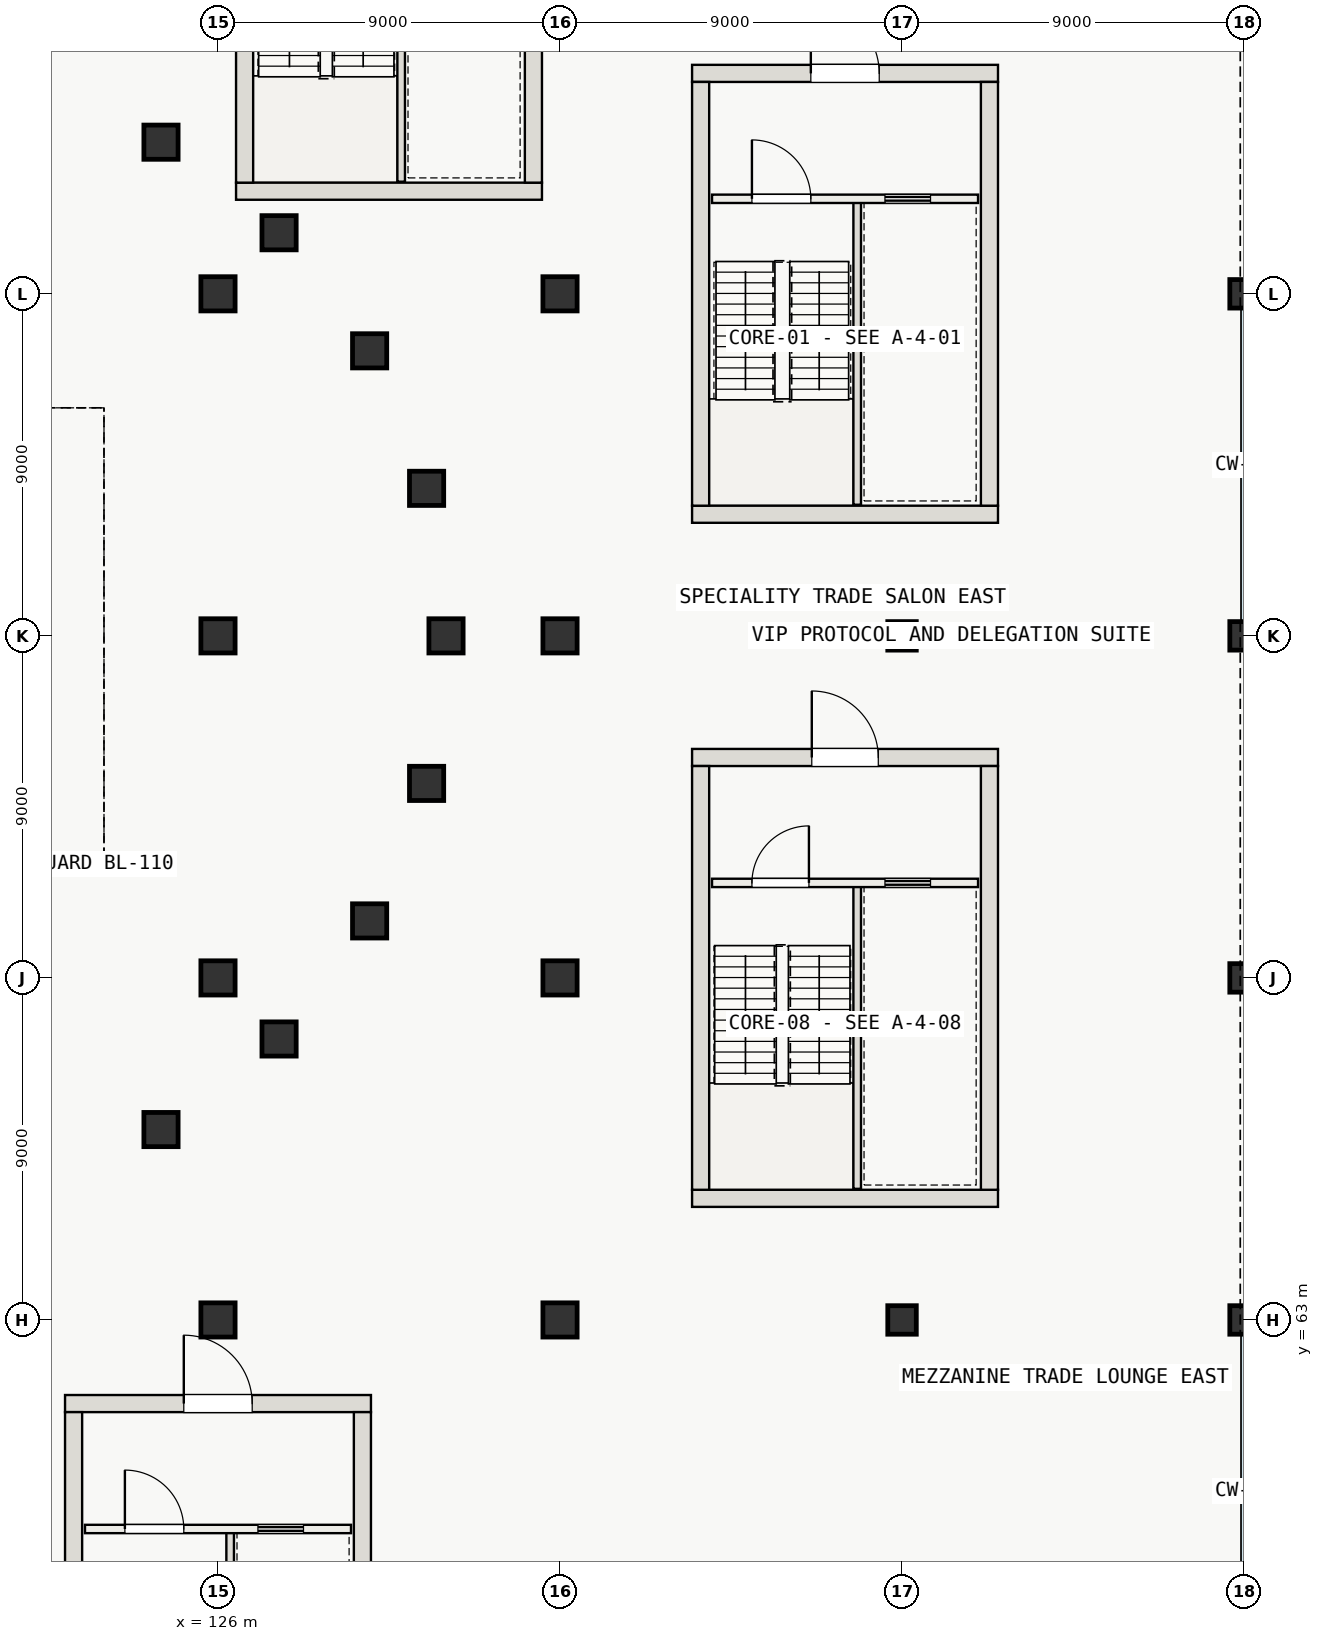
"""IFC4 building model, lengths in metres.
Left out: names, types, materials, properties, quantities, classifications, styles, units other than length and angle.
Written with IfcOpenShell. Run it as: python <this file> out.ifc"""

import sys

from ifc_helpers import new_model, si_unit, direction, frame, frame_2d, origin, origin_2d, place, context, subcontext, project, spatial, rectangle, circle, extrude, element, fill, save


model = new_model("IFC4")
c1 = context("Model", 3, precision=1e-05, world=origin(), true_north=direction((0.0, 1.0)))
c2 = subcontext(c1, "Body", "Model", "MODEL_VIEW")
j1 = project(units=[si_unit("LENGTHUNIT", "METRE"), si_unit("PLANEANGLEUNIT", "RADIAN")], contexts=[c1])
p1 = place(None, origin())
s1 = spatial("IfcSite", under=j1, at=p1, CompositionType="ELEMENT")
p2 = place(p1, origin())
s2 = spatial("IfcBuilding", under=s1, at=p2, CompositionType="ELEMENT")
p3 = place(p2, frame((0.0, 0.0, 12.0)))
s3 = spatial("IfcBuildingStorey", under=s2, at=p3, CompositionType="ELEMENT", Elevation=12.0)
p4 = place(p3, frame((138.475, 84.2, 0.0), z_axis=(0.0, 0.0, 1.0), x_axis=(1.0, 0.0, 0.0)))
e1 = element("IfcWall", 1, at=p4, inside=s3, PredefinedType="SHEAR", context=c2, shape_type="SweptSolid", body=[
    extrude(rectangle(XDim=8.05, YDim=0.45, at=frame_2d((4.025, 0.0))), origin(), (0.0, 0.0, 1.0), 4.8),
])
p5 = place(p3, frame((138.475, 95.8, 0.0), z_axis=(0.0, 0.0, 1.0), x_axis=(1.0, 0.0, 0.0)))
e2 = element("IfcWall", 2, at=p5, inside=s3, PredefinedType="SHEAR", context=c2, shape_type="SweptSolid", body=[
    extrude(rectangle(XDim=8.05, YDim=0.45, at=frame_2d((4.025, 0.0))), origin(), (0.0, 0.0, 1.0), 4.8),
])
p6 = place(p5, frame((3.125, 0.0, 0.0)))
e3 = element("IfcOpeningElement", 3, at=p6, cuts=e2, PredefinedType="OPENING", context=c2, shape_type="SweptSolid", body=[
    extrude(rectangle(XDim=1.8, YDim=2.3, at=frame_2d((0.9, 1.15))), frame((0.0, 0.235, 0.0), z_axis=(0.0, -1.0, 0.0), x_axis=(1.0, 0.0, 0.0)), (0.0, 0.0, 1.0), 0.47),
])
for number, where, z_axis, x_axis in (
    (4, (138.7, 84.425, 0.0), (0.0, 0.0, 1.0), (0.0, 1.0, 0.0)),
    (5, (146.3, 84.425, 0.0), (0.0, 0.0, 1.0), (0.0, 1.0, 0.0)),
):
    element("IfcWall", number, at=place(p3, frame(where, z_axis=z_axis, x_axis=x_axis)), inside=s3, PredefinedType="SHEAR", context=c2, shape_type="SweptSolid", body=[
        extrude(rectangle(XDim=11.15, YDim=0.45, at=frame_2d((5.575, 0.0))), origin(), (0.0, 0.0, 1.0), 4.8),
    ])
p7 = place(p3, frame((126.475, 92.7, 0.0), z_axis=(0.0, 0.0, 1.0), x_axis=(1.0, 0.0, 0.0)))
e6 = element("IfcWall", 6, at=p7, inside=s3, PredefinedType="SHEAR", context=c2, shape_type="SweptSolid", body=[
    extrude(rectangle(XDim=8.05, YDim=0.45, at=frame_2d((4.025, 0.0))), origin(), (0.0, 0.0, 1.0), 4.8),
])
for number, where, z_axis, x_axis in (
    (7, (126.7, 92.925, 0.0), (0.0, 0.0, 1.0), (0.0, 1.0, 0.0)),
    (8, (134.3, 92.925, 0.0), (0.0, 0.0, 1.0), (0.0, 1.0, 0.0)),
):
    element("IfcWall", number, at=place(p3, frame(where, z_axis=z_axis, x_axis=x_axis)), inside=s3, PredefinedType="SHEAR", context=c2, shape_type="SweptSolid", body=[
        extrude(rectangle(XDim=11.15, YDim=0.45, at=frame_2d((5.575, 0.0))), origin(), (0.0, 0.0, 1.0), 4.8),
    ])
p8 = place(p3, frame((121.975, 60.8, 0.0), z_axis=(0.0, 0.0, 1.0), x_axis=(1.0, 0.0, 0.0)))
e9 = element("IfcWall", 9, at=p8, inside=s3, PredefinedType="SHEAR", context=c2, shape_type="SweptSolid", body=[
    extrude(rectangle(XDim=8.05, YDim=0.45, at=frame_2d((4.025, 0.0))), origin(), (0.0, 0.0, 1.0), 4.8),
])
p9 = place(p8, frame((3.125, 0.0, 0.0)))
e10 = element("IfcOpeningElement", 10, at=p9, cuts=e9, PredefinedType="OPENING", context=c2, shape_type="SweptSolid", body=[
    extrude(rectangle(XDim=1.8, YDim=2.3, at=frame_2d((0.9, 1.15))), frame((0.0, 0.235, 0.0), z_axis=(0.0, -1.0, 0.0), x_axis=(1.0, 0.0, 0.0)), (0.0, 0.0, 1.0), 0.47),
])
for number, where, z_axis, x_axis in (
    (11, (122.2, 49.425, 0.0), (0.0, 0.0, 1.0), (0.0, 1.0, 0.0)),
    (12, (129.8, 49.425, 0.0), (0.0, 0.0, 1.0), (0.0, 1.0, 0.0)),
):
    element("IfcWall", number, at=place(p3, frame(where, z_axis=z_axis, x_axis=x_axis)), inside=s3, PredefinedType="SHEAR", context=c2, shape_type="SweptSolid", body=[
        extrude(rectangle(XDim=11.15, YDim=0.45, at=frame_2d((5.575, 0.0))), origin(), (0.0, 0.0, 1.0), 4.8),
    ])
p10 = place(p3, frame((138.475, 66.2, 0.0), z_axis=(0.0, 0.0, 1.0), x_axis=(1.0, 0.0, 0.0)))
e13 = element("IfcWall", 13, at=p10, inside=s3, PredefinedType="SHEAR", context=c2, shape_type="SweptSolid", body=[
    extrude(rectangle(XDim=8.05, YDim=0.45, at=frame_2d((4.025, 0.0))), origin(), (0.0, 0.0, 1.0), 4.8),
])
p11 = place(p3, frame((138.475, 77.8, 0.0), z_axis=(0.0, 0.0, 1.0), x_axis=(1.0, 0.0, 0.0)))
e14 = element("IfcWall", 14, at=p11, inside=s3, PredefinedType="SHEAR", context=c2, shape_type="SweptSolid", body=[
    extrude(rectangle(XDim=8.05, YDim=0.45, at=frame_2d((4.025, 0.0))), origin(), (0.0, 0.0, 1.0), 4.8),
])
p12 = place(p11, frame((3.15, 0.0, 0.0)))
e15 = element("IfcOpeningElement", 15, at=p12, cuts=e14, PredefinedType="OPENING", context=c2, shape_type="SweptSolid", body=[
    extrude(rectangle(XDim=1.75, YDim=2.3, at=frame_2d((0.875, 1.15))), frame((0.0, 0.235, 0.0), z_axis=(0.0, -1.0, 0.0), x_axis=(1.0, 0.0, 0.0)), (0.0, 0.0, 1.0), 0.47),
])
for number, where, z_axis, x_axis in (
    (16, (138.7, 66.425, 0.0), (0.0, 0.0, 1.0), (0.0, 1.0, 0.0)),
    (17, (146.3, 66.425, 0.0), (0.0, 0.0, 1.0), (0.0, 1.0, 0.0)),
):
    element("IfcWall", number, at=place(p3, frame(where, z_axis=z_axis, x_axis=x_axis)), inside=s3, PredefinedType="SHEAR", context=c2, shape_type="SweptSolid", body=[
        extrude(rectangle(XDim=11.15, YDim=0.45, at=frame_2d((5.575, 0.0))), origin(), (0.0, 0.0, 1.0), 4.8),
    ])
for number, where, z_axis, x_axis in (
    (18, (124.5, 68.01, 0.0), (0.0, 0.0, 1.0), (1.0, 0.0, 0.0)),
    (19, (124.5, 93.99, 0.0), (0.0, 0.0, 1.0), (1.0, 0.0, 0.0)),
):
    element("IfcColumn", number, at=place(p3, frame(where, z_axis=z_axis, x_axis=x_axis)), inside=s3, PredefinedType="COLUMN", context=c2, shape_type="SweptSolid", body=[
        extrude(circle(Radius=0.45, at=origin_2d()), origin(), (0.0, 0.0, 1.0), 4.8),
    ])
for number, where, z_axis, x_axis in (
    (20, (126.0, 63.0, 0.0), (0.0, 0.0, 1.0), (1.0, 0.0, 0.0)),
    (21, (126.0, 72.0, 0.0), (0.0, 0.0, 1.0), (1.0, 0.0, 0.0)),
    (22, (126.0, 81.0, 0.0), (0.0, 0.0, 1.0), (1.0, 0.0, 0.0)),
    (23, (126.0, 90.0, 0.0), (0.0, 0.0, 1.0), (1.0, 0.0, 0.0)),
):
    element("IfcColumn", number, at=place(p3, frame(where, z_axis=z_axis, x_axis=x_axis)), inside=s3, PredefinedType="COLUMN", context=c2, shape_type="SweptSolid", body=[
        extrude(rectangle(XDim=0.9, YDim=0.9, at=origin_2d()), origin(), (0.0, 0.0, 1.0), 4.8),
    ])
for number, where, z_axis, x_axis in (
    (24, (127.607, 70.393, 0.0), (0.0, 0.0, 1.0), (1.0, 0.0, 0.0)),
    (25, (127.607, 91.607, 0.0), (0.0, 0.0, 1.0), (1.0, 0.0, 0.0)),
    (26, (129.99, 73.5, 0.0), (0.0, 0.0, 1.0), (1.0, 0.0, 0.0)),
    (27, (129.99, 88.5, 0.0), (0.0, 0.0, 1.0), (1.0, 0.0, 0.0)),
    (28, (131.489, 77.118, 0.0), (0.0, 0.0, 1.0), (1.0, 0.0, 0.0)),
    (29, (131.489, 84.882, 0.0), (0.0, 0.0, 1.0), (1.0, 0.0, 0.0)),
    (30, (132.0, 81.0, 0.0), (0.0, 0.0, 1.0), (1.0, 0.0, 0.0)),
):
    element("IfcColumn", number, at=place(p3, frame(where, z_axis=z_axis, x_axis=x_axis)), inside=s3, PredefinedType="COLUMN", context=c2, shape_type="SweptSolid", body=[
        extrude(circle(Radius=0.45, at=origin_2d()), origin(), (0.0, 0.0, 1.0), 4.8),
    ])
for number, where, z_axis, x_axis in (
    (31, (135.0, 63.0, 0.0), (0.0, 0.0, 1.0), (1.0, 0.0, 0.0)),
    (32, (135.0, 72.0, 0.0), (0.0, 0.0, 1.0), (1.0, 0.0, 0.0)),
    (33, (135.0, 81.0, 0.0), (0.0, 0.0, 1.0), (1.0, 0.0, 0.0)),
    (34, (135.0, 90.0, 0.0), (0.0, 0.0, 1.0), (1.0, 0.0, 0.0)),
):
    element("IfcColumn", number, at=place(p3, frame(where, z_axis=z_axis, x_axis=x_axis)), inside=s3, PredefinedType="COLUMN", context=c2, shape_type="SweptSolid", body=[
        extrude(rectangle(XDim=0.9, YDim=0.9, at=origin_2d()), origin(), (0.0, 0.0, 1.0), 4.8),
    ])
for number, where, z_axis, x_axis in (
    (35, (144.0, 63.0, 0.0), (0.0, 0.0, 1.0), (1.0, 0.0, 0.0)),
    (36, (144.0, 81.0, 0.0), (0.0, 0.0, 1.0), (1.0, 0.0, 0.0)),
    (37, (153.0, 63.0, 0.0), (0.0, 0.0, 1.0), (1.0, 0.0, 0.0)),
    (38, (153.0, 72.0, 0.0), (0.0, 0.0, 1.0), (1.0, 0.0, 0.0)),
    (39, (153.0, 81.0, 0.0), (0.0, 0.0, 1.0), (1.0, 0.0, 0.0)),
    (40, (153.0, 90.0, 0.0), (0.0, 0.0, 1.0), (1.0, 0.0, 0.0)),
):
    element("IfcColumn", number, at=place(p3, frame(where, z_axis=z_axis, x_axis=x_axis)), inside=s3, PredefinedType="COLUMN", context=c2, shape_type="SweptSolid", body=[
        extrude(rectangle(XDim=0.75, YDim=0.75, at=origin_2d()), origin(), (0.0, 0.0, 1.0), 4.8),
    ])
p13 = place(p3, frame((142.82, 84.45, 0.0), z_axis=(0.0, 0.0, 1.0), x_axis=(0.0, 1.0, 0.0)))
e41 = element("IfcWall", 41, at=p13, inside=s3, PredefinedType="SOLIDWALL", context=c2, shape_type="SweptSolid", body=[
    extrude(rectangle(XDim=8.0, YDim=0.2, at=frame_2d((4.0, 0.0))), origin(), (0.0, 0.0, 1.0), 4.8),
])
p14 = place(p3, frame((139.0, 92.5, 0.0), z_axis=(0.0, 0.0, 1.0), x_axis=(1.0, 0.0, 0.0)))
e42 = element("IfcWall", 42, at=p14, inside=s3, PredefinedType="SOLIDWALL", context=c2, shape_type="SweptSolid", body=[
    extrude(rectangle(XDim=7.0, YDim=0.22, at=frame_2d((3.5, 0.0))), origin(), (0.0, 0.0, 1.0), 4.5),
])
p15 = place(p14, frame((1.05, 0.0, 0.0)))
e43 = element("IfcOpeningElement", 43, at=p15, cuts=e42, PredefinedType="OPENING", context=c2, shape_type="SweptSolid", body=[
    extrude(rectangle(XDim=1.55, YDim=2.2, at=frame_2d((0.775, 1.1))), frame((0.0, 0.12, 0.0), z_axis=(0.0, -1.0, 0.0), x_axis=(1.0, 0.0, 0.0)), (0.0, 0.0, 1.0), 0.24),
])
p16 = place(p14, frame((4.55, 0.0, 0.0)))
e44 = element("IfcOpeningElement", 44, at=p16, cuts=e42, PredefinedType="OPENING", context=c2, shape_type="SweptSolid", body=[
    extrude(rectangle(XDim=1.2, YDim=2.2, at=frame_2d((0.6, 1.1))), frame((0.0, 0.12, 0.0), z_axis=(0.0, -1.0, 0.0), x_axis=(1.0, 0.0, 0.0)), (0.0, 0.0, 1.0), 0.24),
])
for number, where, z_axis, x_axis in (
    (45, (130.82, 92.95, 0.0), (0.0, 0.0, 1.0), (0.0, 1.0, 0.0)),
    (46, (126.32, 49.45, 0.0), (0.0, 0.0, 1.0), (0.0, 1.0, 0.0)),
):
    element("IfcWall", number, at=place(p3, frame(where, z_axis=z_axis, x_axis=x_axis)), inside=s3, PredefinedType="SOLIDWALL", context=c2, shape_type="SweptSolid", body=[
        extrude(rectangle(XDim=8.0, YDim=0.2, at=frame_2d((4.0, 0.0))), origin(), (0.0, 0.0, 1.0), 4.8),
    ])
p17 = place(p3, frame((122.5, 57.5, 0.0), z_axis=(0.0, 0.0, 1.0), x_axis=(1.0, 0.0, 0.0)))
e47 = element("IfcWall", 47, at=p17, inside=s3, PredefinedType="SOLIDWALL", context=c2, shape_type="SweptSolid", body=[
    extrude(rectangle(XDim=7.0, YDim=0.22, at=frame_2d((3.5, 0.0))), origin(), (0.0, 0.0, 1.0), 4.5),
])
p18 = place(p17, frame((1.05, 0.0, 0.0)))
e48 = element("IfcOpeningElement", 48, at=p18, cuts=e47, PredefinedType="OPENING", context=c2, shape_type="SweptSolid", body=[
    extrude(rectangle(XDim=1.55, YDim=2.2, at=frame_2d((0.775, 1.1))), frame((0.0, 0.12, 0.0), z_axis=(0.0, -1.0, 0.0), x_axis=(1.0, 0.0, 0.0)), (0.0, 0.0, 1.0), 0.24),
])
p19 = place(p17, frame((4.55, 0.0, 0.0)))
e49 = element("IfcOpeningElement", 49, at=p19, cuts=e47, PredefinedType="OPENING", context=c2, shape_type="SweptSolid", body=[
    extrude(rectangle(XDim=1.2, YDim=2.2, at=frame_2d((0.6, 1.1))), frame((0.0, 0.12, 0.0), z_axis=(0.0, -1.0, 0.0), x_axis=(1.0, 0.0, 0.0)), (0.0, 0.0, 1.0), 0.24),
])
p20 = place(p3, frame((142.82, 66.45, 0.0), z_axis=(0.0, 0.0, 1.0), x_axis=(0.0, 1.0, 0.0)))
e50 = element("IfcWall", 50, at=p20, inside=s3, PredefinedType="SOLIDWALL", context=c2, shape_type="SweptSolid", body=[
    extrude(rectangle(XDim=8.0, YDim=0.2, at=frame_2d((4.0, 0.0))), origin(), (0.0, 0.0, 1.0), 4.8),
])
p21 = place(p3, frame((139.0, 74.5, 0.0), z_axis=(0.0, 0.0, 1.0), x_axis=(1.0, 0.0, 0.0)))
e51 = element("IfcWall", 51, at=p21, inside=s3, PredefinedType="SOLIDWALL", context=c2, shape_type="SweptSolid", body=[
    extrude(rectangle(XDim=7.0, YDim=0.22, at=frame_2d((3.5, 0.0))), origin(), (0.0, 0.0, 1.0), 4.5),
])
p22 = place(p21, frame((1.05, 0.0, 0.0)))
e52 = element("IfcOpeningElement", 52, at=p22, cuts=e51, PredefinedType="OPENING", context=c2, shape_type="SweptSolid", body=[
    extrude(rectangle(XDim=1.5, YDim=2.2, at=frame_2d((0.75, 1.1))), frame((0.0, 0.12, 0.0), z_axis=(0.0, -1.0, 0.0), x_axis=(1.0, 0.0, 0.0)), (0.0, 0.0, 1.0), 0.24),
])
p23 = place(p21, frame((4.55, 0.0, 0.0)))
e53 = element("IfcOpeningElement", 53, at=p23, cuts=e51, PredefinedType="OPENING", context=c2, shape_type="SweptSolid", body=[
    extrude(rectangle(XDim=1.2, YDim=2.2, at=frame_2d((0.6, 1.1))), frame((0.0, 0.12, 0.0), z_axis=(0.0, -1.0, 0.0), x_axis=(1.0, 0.0, 0.0)), (0.0, 0.0, 1.0), 0.24),
])
p24 = place(p15, origin())
e54 = element("IfcDoor", 54, at=p24, inside=s3, OperationType="SINGLE_SWING_LEFT", PredefinedType="DOOR", context=c2, shape_type="SweptSolid", body=[
    extrude(rectangle(XDim=1.55, YDim=2.2, at=frame_2d((0.775, 1.1))), frame((0.0, 0.025, 0.0), z_axis=(0.0, -1.0, 0.0), x_axis=(1.0, 0.0, 0.0)), (0.0, 0.0, 1.0), 0.05),
])
fill(e43, e54)
p25 = place(p16, origin())
e55 = element("IfcDoor", 55, at=p25, inside=s3, OperationType="SLIDING_TO_LEFT", PredefinedType="DOOR", context=c2, shape_type="SweptSolid", body=[
    extrude(rectangle(XDim=1.2, YDim=2.2, at=frame_2d((0.6, 1.1))), frame((0.0, 0.025, 0.0), z_axis=(0.0, -1.0, 0.0), x_axis=(1.0, 0.0, 0.0)), (0.0, 0.0, 1.0), 0.05),
])
fill(e44, e55)
p26 = place(p6, origin())
e56 = element("IfcDoor", 56, at=p26, inside=s3, OperationType="DOUBLE_DOOR_SINGLE_SWING", PredefinedType="DOOR", context=c2, shape_type="SweptSolid", body=[
    extrude(rectangle(XDim=1.8, YDim=2.3, at=frame_2d((0.9, 1.15))), frame((0.0, 0.025, 0.0), z_axis=(0.0, -1.0, 0.0), x_axis=(1.0, 0.0, 0.0)), (0.0, 0.0, 1.0), 0.05),
])
fill(e3, e56)
p27 = place(p18, origin())
e57 = element("IfcDoor", 57, at=p27, inside=s3, OperationType="SINGLE_SWING_LEFT", PredefinedType="DOOR", context=c2, shape_type="SweptSolid", body=[
    extrude(rectangle(XDim=1.55, YDim=2.2, at=frame_2d((0.775, 1.1))), frame((0.0, 0.025, 0.0), z_axis=(0.0, -1.0, 0.0), x_axis=(1.0, 0.0, 0.0)), (0.0, 0.0, 1.0), 0.05),
])
fill(e48, e57)
p28 = place(p19, origin())
e58 = element("IfcDoor", 58, at=p28, inside=s3, OperationType="SLIDING_TO_LEFT", PredefinedType="DOOR", context=c2, shape_type="SweptSolid", body=[
    extrude(rectangle(XDim=1.2, YDim=2.2, at=frame_2d((0.6, 1.1))), frame((0.0, 0.025, 0.0), z_axis=(0.0, -1.0, 0.0), x_axis=(1.0, 0.0, 0.0)), (0.0, 0.0, 1.0), 0.05),
])
fill(e49, e58)
p29 = place(p9, origin())
e59 = element("IfcDoor", 59, at=p29, inside=s3, OperationType="DOUBLE_DOOR_SINGLE_SWING", PredefinedType="DOOR", context=c2, shape_type="SweptSolid", body=[
    extrude(rectangle(XDim=1.8, YDim=2.3, at=frame_2d((0.9, 1.15))), frame((0.0, 0.025, 0.0), z_axis=(0.0, -1.0, 0.0), x_axis=(1.0, 0.0, 0.0)), (0.0, 0.0, 1.0), 0.05),
])
fill(e10, e59)
p30 = place(p22, origin())
e60 = element("IfcDoor", 60, at=p30, inside=s3, OperationType="SINGLE_SWING_RIGHT", PredefinedType="DOOR", context=c2, shape_type="SweptSolid", body=[
    extrude(rectangle(XDim=1.5, YDim=2.2, at=frame_2d((0.75, 1.1))), frame((0.0, 0.025, 0.0), z_axis=(0.0, -1.0, 0.0), x_axis=(1.0, 0.0, 0.0)), (0.0, 0.0, 1.0), 0.05),
])
fill(e52, e60)
p31 = place(p23, origin())
e61 = element("IfcDoor", 61, at=p31, inside=s3, OperationType="SLIDING_TO_RIGHT", PredefinedType="DOOR", context=c2, shape_type="SweptSolid", body=[
    extrude(rectangle(XDim=1.2, YDim=2.2, at=frame_2d((0.6, 1.1))), frame((0.0, 0.025, 0.0), z_axis=(0.0, -1.0, 0.0), x_axis=(1.0, 0.0, 0.0)), (0.0, 0.0, 1.0), 0.05),
])
fill(e53, e61)
p32 = place(p12, origin())
e62 = element("IfcDoor", 62, at=p32, inside=s3, OperationType="DOUBLE_DOOR_SINGLE_SWING", PredefinedType="DOOR", context=c2, shape_type="SweptSolid", body=[
    extrude(rectangle(XDim=1.75, YDim=2.3, at=frame_2d((0.875, 1.15))), frame((0.0, 0.025, 0.0), z_axis=(0.0, -1.0, 0.0), x_axis=(1.0, 0.0, 0.0)), (0.0, 0.0, 1.0), 0.05),
])
fill(e15, e62)
save(model, sys.argv[1])
